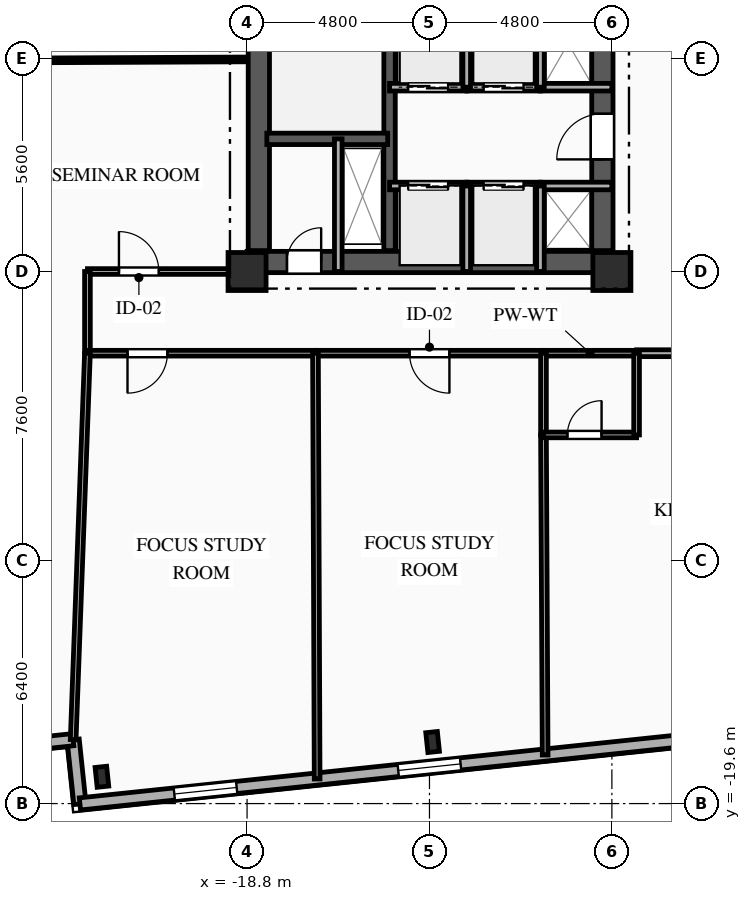
"""IFC4 building model, lengths in metres.
Left out: names, types, materials, properties, quantities, classifications, styles, units other than length and angle.
Written with IfcOpenShell. Run it as: python <this file> out.ifc"""

import sys

from ifc_helpers import new_model, si_unit, direction, frame, frame_2d, origin, origin_2d, place, context, subcontext, project, spatial, rectangle, i_section, extrude, element, fill, save


model = new_model("IFC4")
c1 = context("Model", 3, precision=1e-05, world=origin(), true_north=direction((0.0, 1.0)))
c2 = subcontext(c1, "Body", "Model", "MODEL_VIEW")
j1 = project(units=[si_unit("LENGTHUNIT", "METRE"), si_unit("PLANEANGLEUNIT", "RADIAN")], contexts=[c1])
p1 = place(None, origin())
s1 = spatial("IfcSite", under=j1, at=p1, CompositionType="ELEMENT")
p2 = place(p1, origin())
s2 = spatial("IfcBuilding", under=s1, at=p2, CompositionType="ELEMENT")
p3 = place(p2, frame((0.0, 0.0, 112.5)))
s3 = spatial("IfcBuildingStorey", under=s2, at=p3, CompositionType="ELEMENT", Elevation=112.5)
for number, where, z_axis, x_axis in (
    (1, (-18.8, -5.6, 0.0), (0.0, 0.0, 1.0), (1.0, 0.0, 0.0)),
    (2, (-9.2, -5.6, 0.0), (0.0, 0.0, 1.0), (1.0, 0.0, 0.0)),
):
    element("IfcColumn", number, at=place(p3, frame(where, z_axis=z_axis, x_axis=x_axis)), inside=s3, PredefinedType="COLUMN", context=c2, shape_type="SweptSolid", body=[
        extrude(rectangle(XDim=1.0, YDim=1.0, at=origin_2d()), origin(), (0.0, 0.0, 1.0), 3.35),
    ])
for number, where, z_axis, x_axis in (
    (3, (-22.619, -18.895, 0.0), (0.0, 0.0, 1.0), (0.995, 0.105, 0.0)),
    (4, (-13.917, -17.98, 0.0), (0.0, 0.0, 1.0), (0.995, 0.105, 0.0)),
):
    element("IfcColumn", number, at=place(p3, frame(where, z_axis=z_axis, x_axis=x_axis)), inside=s3, PredefinedType="COLUMN", context=c2, shape_type="SweptSolid", body=[
        extrude(i_section(OverallWidth=0.306, OverallDepth=0.524, WebThickness=0.021, FlangeThickness=0.04, FilletRadius=0.027, at=origin_2d()), origin(), (0.0, 0.0, 1.0), 3.35),
    ])
for number, where, z_axis, x_axis in (
    (5, (-23.198, -19.609, 0.0), (0.0, 0.0, 1.0), (-0.105, 0.995, 0.0)),
    (6, (-23.376, -17.919, 0.0), (0.0, 0.0, 1.0), (-0.995, -0.105, 0.0)),
):
    element("IfcWall", number, at=place(p3, frame(where, z_axis=z_axis, x_axis=x_axis)), inside=s3, PredefinedType="SOLIDWALL", context=c2, shape_type="SweptSolid", body=[
        extrude(rectangle(XDim=1.7, YDim=0.32, at=frame_2d((0.85, 0.0))), origin(), (0.0, 0.0, 1.0), 3.045),
    ])
p4 = place(p3, frame((30.307, -13.986, 0.0), z_axis=(0.0, 0.0, 1.0), x_axis=(-0.994521628355, -0.104531003701, 0.0)))
e7 = element("IfcWall", 7, at=p4, inside=s3, PredefinedType="SOLIDWALL", context=c2, shape_type="SweptSolid", body=[
    extrude(rectangle(XDim=53.8, YDim=0.32, at=frame_2d((26.9, 0.0))), origin(), (0.0, 0.0, 1.0), 3.045),
])
p5 = place(p4, frame((3.098, 0.0, 0.85)))
e8 = element("IfcOpeningElement", 8, at=p5, cuts=e7, PredefinedType="OPENING", context=c2, shape_type="SweptSolid", body=[
    extrude(rectangle(XDim=1.65, YDim=1.85, at=frame_2d((0.825, 0.925))), frame((0.0, 0.17, 0.0), z_axis=(0.0, -1.0, 0.0), x_axis=(1.0, 0.0, 0.0)), (0.0, 0.0, 1.0), 0.34),
])
p6 = place(p4, frame((9.302, 0.0, 0.85)))
e9 = element("IfcOpeningElement", 9, at=p6, cuts=e7, PredefinedType="OPENING", context=c2, shape_type="SweptSolid", body=[
    extrude(rectangle(XDim=1.65, YDim=1.85, at=frame_2d((0.825, 0.925))), frame((0.0, 0.17, 0.0), z_axis=(0.0, -1.0, 0.0), x_axis=(1.0, 0.0, 0.0)), (0.0, 0.0, 1.0), 0.34),
])
p7 = place(p4, frame((14.827, 0.0, 0.85)))
e10 = element("IfcOpeningElement", 10, at=p7, cuts=e7, PredefinedType="OPENING", context=c2, shape_type="SweptSolid", body=[
    extrude(rectangle(XDim=1.65, YDim=1.85, at=frame_2d((0.825, 0.925))), frame((0.0, 0.17, 0.0), z_axis=(0.0, -1.0, 0.0), x_axis=(1.0, 0.0, 0.0)), (0.0, 0.0, 1.0), 0.34),
])
p8 = place(p4, frame((23.078, 0.0, 0.85)))
e11 = element("IfcOpeningElement", 11, at=p8, cuts=e7, PredefinedType="OPENING", context=c2, shape_type="SweptSolid", body=[
    extrude(rectangle(XDim=2.2, YDim=1.85, at=frame_2d((1.1, 0.925))), frame((0.0, 0.17, 0.0), z_axis=(0.0, -1.0, 0.0), x_axis=(1.0, 0.0, 0.0)), (0.0, 0.0, 1.0), 0.34),
])
p9 = place(p4, frame((34.646, 0.0, 0.85)))
e12 = element("IfcOpeningElement", 12, at=p9, cuts=e7, PredefinedType="OPENING", context=c2, shape_type="SweptSolid", body=[
    extrude(rectangle(XDim=2.2, YDim=1.85, at=frame_2d((1.1, 0.925))), frame((0.0, 0.17, 0.0), z_axis=(0.0, -1.0, 0.0), x_axis=(1.0, 0.0, 0.0)), (0.0, 0.0, 1.0), 0.34),
])
p10 = place(p4, frame((43.728, 0.0, 0.85)))
e13 = element("IfcOpeningElement", 13, at=p10, cuts=e7, PredefinedType="OPENING", context=c2, shape_type="SweptSolid", body=[
    extrude(rectangle(XDim=1.65, YDim=1.85, at=frame_2d((0.825, 0.925))), frame((0.0, 0.17, 0.0), z_axis=(0.0, -1.0, 0.0), x_axis=(1.0, 0.0, 0.0)), (0.0, 0.0, 1.0), 0.34),
])
p11 = place(p4, frame((49.653, 0.0, 0.85)))
e14 = element("IfcOpeningElement", 14, at=p11, cuts=e7, PredefinedType="OPENING", context=c2, shape_type="SweptSolid", body=[
    extrude(rectangle(XDim=1.65, YDim=1.85, at=frame_2d((0.825, 0.925))), frame((0.0, 0.17, 0.0), z_axis=(0.0, -1.0, 0.0), x_axis=(1.0, 0.0, 0.0)), (0.0, 0.0, 1.0), 0.34),
])
p12 = place(p3, frame((-18.8, -5.35, 0.0), z_axis=(0.0, 0.0, 1.0), x_axis=(1.0, 0.0, 0.0)))
e15 = element("IfcWall", 15, at=p12, inside=s3, PredefinedType="SHEAR", context=c2, shape_type="SweptSolid", body=[
    extrude(rectangle(XDim=9.6, YDim=0.56, at=frame_2d((4.8, 0.0))), origin(), (0.0, 0.0, 1.0), 3.045),
])
p13 = place(p12, frame((1.05, 0.0, 0.0)))
e16 = element("IfcOpeningElement", 16, at=p13, cuts=e15, PredefinedType="OPENING", context=c2, shape_type="SweptSolid", body=[
    extrude(rectangle(XDim=0.9, YDim=2.1, at=frame_2d((0.45, 1.05))), frame((0.0, 0.29, 0.0), z_axis=(0.0, -1.0, 0.0), x_axis=(1.0, 0.0, 0.0)), (0.0, 0.0, 1.0), 0.58),
])
p14 = place(p3, frame((-18.49, -5.05, 0.0), z_axis=(0.0, 0.0, 1.0), x_axis=(0.0, 1.0, 0.0)))
e17 = element("IfcWall", 17, at=p14, inside=s3, PredefinedType="SHEAR", context=c2, shape_type="SweptSolid", body=[
    extrude(rectangle(XDim=10.1, YDim=0.56, at=frame_2d((5.05, 0.0))), origin(), (0.0, 0.0, 1.0), 3.045),
])
p15 = place(p3, frame((-9.45, -5.05, 0.0), z_axis=(0.0, 0.0, 1.0), x_axis=(0.0, 1.0, 0.0)))
e18 = element("IfcWall", 18, at=p15, inside=s3, PredefinedType="SHEAR", context=c2, shape_type="SweptSolid", body=[
    extrude(rectangle(XDim=10.1, YDim=0.56, at=frame_2d((5.05, 0.0))), origin(), (0.0, 0.0, 1.0), 3.045),
])
p16 = place(p15, frame((7.15, 0.0, 0.0)))
e19 = element("IfcOpeningElement", 19, at=p16, cuts=e18, PredefinedType="OPENING", context=c2, shape_type="SweptSolid", body=[
    extrude(rectangle(XDim=0.9, YDim=2.1, at=frame_2d((0.45, 1.05))), frame((0.0, 0.29, 0.0), z_axis=(0.0, -1.0, 0.0), x_axis=(1.0, 0.0, 0.0)), (0.0, 0.0, 1.0), 0.58),
])
p17 = place(p15, frame((2.4, 0.0, 0.0)))
e20 = element("IfcOpeningElement", 20, at=p17, cuts=e18, PredefinedType="OPENING", context=c2, shape_type="SweptSolid", body=[
    extrude(rectangle(XDim=1.2, YDim=2.15, at=frame_2d((0.6, 1.075))), frame((0.0, 0.29, 0.0), z_axis=(0.0, -1.0, 0.0), x_axis=(1.0, 0.0, 0.0)), (0.0, 0.0, 1.0), 0.58),
])
p18 = place(p3, frame((-15.05, -5.05, 0.0), z_axis=(0.0, 0.0, 1.0), x_axis=(0.0, 1.0, 0.0)))
e21 = element("IfcWall", 21, at=p18, inside=s3, PredefinedType="SHEAR", context=c2, shape_type="SweptSolid", body=[
    extrude(rectangle(XDim=10.1, YDim=0.3, at=frame_2d((5.05, 0.0))), origin(), (0.0, 0.0, 1.0), 3.045),
])
p19 = place(p3, frame((-18.28, -2.11, 0.0), z_axis=(0.0, 0.0, 1.0), x_axis=(1.0, 0.0, 0.0)))
e22 = element("IfcWall", 22, at=p19, inside=s3, PredefinedType="SHEAR", context=c2, shape_type="SweptSolid", body=[
    extrude(rectangle(XDim=3.18, YDim=0.3, at=frame_2d((1.59, 0.0))), origin(), (0.0, 0.0, 1.0), 3.045),
])
p20 = place(p3, frame((-16.4, -5.6, 0.0), z_axis=(0.0, 0.0, 1.0), x_axis=(0.0, 1.0, 0.0)))
e23 = element("IfcWall", 23, at=p20, inside=s3, PredefinedType="PARTITIONING", context=c2, shape_type="SweptSolid", body=[
    extrude(rectangle(XDim=3.49, YDim=0.2, at=frame_2d((1.745, 0.0))), origin(), (0.0, 0.0, 1.0), 3.045),
])
p21 = place(p3, frame((-15.05, -3.35, 0.0), z_axis=(0.0, 0.0, 1.0), x_axis=(1.0, 0.0, 0.0)))
e24 = element("IfcWall", 24, at=p21, inside=s3, PredefinedType="PARTITIONING", context=c2, shape_type="SweptSolid", body=[
    extrude(rectangle(XDim=2.03, YDim=0.2, at=frame_2d((1.015, 0.0))), origin(), (0.0, 0.0, 1.0), 3.045),
])
p22 = place(p21, frame((0.49, 0.0, 0.0)))
e25 = element("IfcOpeningElement", 25, at=p22, cuts=e24, PredefinedType="OPENING", context=c2, shape_type="SweptSolid", body=[
    extrude(rectangle(XDim=1.05, YDim=2.1, at=frame_2d((0.525, 1.05))), frame((0.0, 0.11, 0.0), z_axis=(0.0, -1.0, 0.0), x_axis=(1.0, 0.0, 0.0)), (0.0, 0.0, 1.0), 0.22),
])
p23 = place(p3, frame((-13.02, -3.35, 0.0), z_axis=(0.0, 0.0, 1.0), x_axis=(1.0, 0.0, 0.0)))
e26 = element("IfcWall", 26, at=p23, inside=s3, PredefinedType="PARTITIONING", context=c2, shape_type="SweptSolid", body=[
    extrude(rectangle(XDim=1.94, YDim=0.2, at=frame_2d((0.97, 0.0))), origin(), (0.0, 0.0, 1.0), 3.045),
])
p24 = place(p23, frame((0.445, 0.0, 0.0)))
e27 = element("IfcOpeningElement", 27, at=p24, cuts=e26, PredefinedType="OPENING", context=c2, shape_type="SweptSolid", body=[
    extrude(rectangle(XDim=1.05, YDim=2.1, at=frame_2d((0.525, 1.05))), frame((0.0, 0.11, 0.0), z_axis=(0.0, -1.0, 0.0), x_axis=(1.0, 0.0, 0.0)), (0.0, 0.0, 1.0), 0.22),
])
p25 = place(p3, frame((-11.08, -3.35, 0.0), z_axis=(0.0, 0.0, 1.0), x_axis=(1.0, 0.0, 0.0)))
e28 = element("IfcWall", 28, at=p25, inside=s3, PredefinedType="PARTITIONING", context=c2, shape_type="SweptSolid", body=[
    extrude(rectangle(XDim=1.88, YDim=0.2, at=frame_2d((0.94, 0.0))), origin(), (0.0, 0.0, 1.0), 2.76),
])
p26 = place(p3, frame((-13.02, -0.75, 0.0), z_axis=(0.0, 0.0, 1.0), x_axis=(-1.0, 0.0, 0.0)))
e29 = element("IfcWall", 29, at=p26, inside=s3, PredefinedType="PARTITIONING", context=c2, shape_type="SweptSolid", body=[
    extrude(rectangle(XDim=2.03, YDim=0.2, at=frame_2d((1.015, 0.0))), origin(), (0.0, 0.0, 1.0), 3.045),
])
p27 = place(p26, frame((0.49, 0.0, 0.0)))
e30 = element("IfcOpeningElement", 30, at=p27, cuts=e29, PredefinedType="OPENING", context=c2, shape_type="SweptSolid", body=[
    extrude(rectangle(XDim=1.05, YDim=2.1, at=frame_2d((0.525, 1.05))), frame((0.0, 0.11, 0.0), z_axis=(0.0, -1.0, 0.0), x_axis=(1.0, 0.0, 0.0)), (0.0, 0.0, 1.0), 0.22),
])
p28 = place(p3, frame((-11.08, -0.75, 0.0), z_axis=(0.0, 0.0, 1.0), x_axis=(-1.0, 0.0, 0.0)))
e31 = element("IfcWall", 31, at=p28, inside=s3, PredefinedType="PARTITIONING", context=c2, shape_type="SweptSolid", body=[
    extrude(rectangle(XDim=1.94, YDim=0.2, at=frame_2d((0.97, 0.0))), origin(), (0.0, 0.0, 1.0), 3.045),
])
p29 = place(p28, frame((0.445, 0.0, 0.0)))
e32 = element("IfcOpeningElement", 32, at=p29, cuts=e31, PredefinedType="OPENING", context=c2, shape_type="SweptSolid", body=[
    extrude(rectangle(XDim=1.05, YDim=2.1, at=frame_2d((0.525, 1.05))), frame((0.0, 0.11, 0.0), z_axis=(0.0, -1.0, 0.0), x_axis=(1.0, 0.0, 0.0)), (0.0, 0.0, 1.0), 0.22),
])
p30 = place(p3, frame((-9.2, -0.75, 0.0), z_axis=(0.0, 0.0, 1.0), x_axis=(-1.0, 0.0, 0.0)))
e33 = element("IfcWall", 33, at=p30, inside=s3, PredefinedType="PARTITIONING", context=c2, shape_type="SweptSolid", body=[
    extrude(rectangle(XDim=1.88, YDim=0.2, at=frame_2d((0.94, 0.0))), origin(), (0.0, 0.0, 1.0), 3.045),
])
for number, where, z_axis, x_axis in (
    (34, (-13.02, -5.6, 0.0), (0.0, 0.0, 1.0), (0.0, 1.0, 0.0)),
    (35, (-11.08, -5.6, 0.0), (0.0, 0.0, 1.0), (0.0, 1.0, 0.0)),
):
    element("IfcWall", number, at=place(p3, frame(where, z_axis=z_axis, x_axis=x_axis)), inside=s3, PredefinedType="PARTITIONING", context=c2, shape_type="SweptSolid", body=[
        extrude(rectangle(XDim=2.25, YDim=0.2, at=frame_2d((1.125, 0.0))), origin(), (0.0, 0.0, 1.0), 3.045),
    ])
for number, where, z_axis, x_axis in (
    (36, (-13.02, -0.75, 0.0), (0.0, 0.0, 1.0), (0.0, 1.0, 0.0)),
    (37, (-11.08, -0.75, 0.0), (0.0, 0.0, 1.0), (0.0, 1.0, 0.0)),
):
    element("IfcWall", number, at=place(p3, frame(where, z_axis=z_axis, x_axis=x_axis)), inside=s3, PredefinedType="PARTITIONING", context=c2, shape_type="SweptSolid", body=[
        extrude(rectangle(XDim=2.3, YDim=0.2, at=frame_2d((1.15, 0.0))), origin(), (0.0, 0.0, 1.0), 3.045),
    ])
p31 = place(p3, frame((-23.0, -5.6, 0.0), z_axis=(0.0, 0.0, 1.0), x_axis=(1.0, 0.0, 0.0)))
e38 = element("IfcWall", 38, at=p31, inside=s3, PredefinedType="PARTITIONING", context=c2, shape_type="SweptSolid", body=[
    extrude(rectangle(XDim=4.2, YDim=0.15, at=frame_2d((2.1, 0.0))), origin(), (0.0, 0.0, 1.0), 3.045),
])
p32 = place(p31, frame((0.829, 0.0, 0.0)))
e39 = element("IfcOpeningElement", 39, at=p32, cuts=e38, PredefinedType="OPENING", context=c2, shape_type="SweptSolid", body=[
    extrude(rectangle(XDim=1.05, YDim=2.15, at=frame_2d((0.525, 1.075))), frame((0.0, 0.085, 0.0), z_axis=(0.0, -1.0, 0.0), x_axis=(1.0, 0.0, 0.0)), (0.0, 0.0, 1.0), 0.17),
])
p33 = place(p3, frame((-23.0, -7.75, 0.0), z_axis=(0.0, 0.0, 1.0), x_axis=(0.0, 1.0, 0.0)))
e40 = element("IfcWall", 40, at=p33, inside=s3, PredefinedType="PARTITIONING", context=c2, shape_type="SweptSolid", body=[
    extrude(rectangle(XDim=2.15, YDim=0.15, at=frame_2d((1.075, 0.0))), origin(), (0.0, 0.0, 1.0), 2.7),
])
p34 = place(p3, frame((-17.0, -7.75, 0.0), z_axis=(0.0, 0.0, 1.0), x_axis=(-1.0, 0.0, 0.0)))
e41 = element("IfcWall", 41, at=p34, inside=s3, PredefinedType="PARTITIONING", context=c2, shape_type="SweptSolid", body=[
    extrude(rectangle(XDim=6.0, YDim=0.15, at=frame_2d((3.0, 0.0))), origin(), (0.0, 0.0, 1.0), 3.045),
])
p35 = place(p34, frame((3.896, 0.0, 0.0)))
e42 = element("IfcOpeningElement", 42, at=p35, cuts=e41, PredefinedType="OPENING", context=c2, shape_type="SweptSolid", body=[
    extrude(rectangle(XDim=1.05, YDim=2.15, at=frame_2d((0.525, 1.075))), frame((0.0, 0.085, 0.0), z_axis=(0.0, -1.0, 0.0), x_axis=(1.0, 0.0, 0.0)), (0.0, 0.0, 1.0), 0.17),
])
p36 = place(p3, frame((-11.0, -7.75, 0.0), z_axis=(0.0, 0.0, 1.0), x_axis=(-1.0, 0.0, 0.0)))
e43 = element("IfcWall", 43, at=p36, inside=s3, PredefinedType="PARTITIONING", context=c2, shape_type="SweptSolid", body=[
    extrude(rectangle(XDim=6.0, YDim=0.15, at=frame_2d((3.0, 0.0))), origin(), (0.0, 0.0, 1.0), 3.045),
])
p37 = place(p36, frame((2.475, 0.0, 0.0)))
e44 = element("IfcOpeningElement", 44, at=p37, cuts=e43, PredefinedType="OPENING", context=c2, shape_type="SweptSolid", body=[
    extrude(rectangle(XDim=1.05, YDim=2.15, at=frame_2d((0.525, 1.075))), frame((0.0, 0.085, 0.0), z_axis=(0.0, -1.0, 0.0), x_axis=(1.0, 0.0, 0.0)), (0.0, 0.0, 1.0), 0.17),
])
p38 = place(p3, frame((0.0, -7.75, 0.0), z_axis=(0.0, 0.0, 1.0), x_axis=(-1.0, 0.0, 0.0)))
e45 = element("IfcWall", 45, at=p38, inside=s3, PredefinedType="PARTITIONING", context=c2, shape_type="SweptSolid", body=[
    extrude(rectangle(XDim=8.55, YDim=0.18, at=frame_2d((4.275, 0.0))), origin(), (0.0, 0.0, 1.0), 3.045),
])
p39 = place(p38, frame((1.379, 0.0, 0.0)))
e46 = element("IfcOpeningElement", 46, at=p39, cuts=e45, PredefinedType="OPENING", context=c2, shape_type="SweptSolid", body=[
    extrude(rectangle(XDim=1.0, YDim=2.15, at=frame_2d((0.5, 1.075))), frame((0.0, 0.1, 0.0), z_axis=(0.0, -1.0, 0.0), x_axis=(1.0, 0.0, 0.0)), (0.0, 0.0, 1.0), 0.2),
])
p40 = place(p3, frame((-8.55, -7.75, 0.0), z_axis=(0.0, 0.0, 1.0), x_axis=(-1.0, 0.0, 0.0)))
e47 = element("IfcWall", 47, at=p40, inside=s3, PredefinedType="PLUMBINGWALL", context=c2, shape_type="SweptSolid", body=[
    extrude(rectangle(XDim=2.45, YDim=0.15, at=frame_2d((1.225, 0.0))), origin(), (0.0, 0.0, 1.0), 3.045),
])
p41 = place(p3, frame((-28.671, -0.064, 0.0), z_axis=(0.0, 0.0, 1.0), x_axis=(0.999990089865, 0.004451985263, 0.0)))
e48 = element("IfcWall", 48, at=p41, inside=s3, PredefinedType="PARTITIONING", context=c2, shape_type="SweptSolid", body=[
    extrude(rectangle(XDim=9.871, YDim=0.125, at=frame_2d((4.936, 0.0))), origin(), (0.0, 0.0, 1.0), 3.045),
])
p42 = place(p3, frame((-23.0, -7.75, 0.0), z_axis=(0.0, 0.0, 1.0), x_axis=(-0.036924695214, -0.999318050914, 0.0)))
e49 = element("IfcWall", 49, at=p42, inside=s3, PredefinedType="PARTITIONING", context=c2, shape_type="SweptSolid", body=[
    extrude(rectangle(XDim=10.176, YDim=0.15, at=frame_2d((5.088, 0.0))), origin(), (0.0, 0.0, 1.0), 3.045),
])
p43 = place(p3, frame((-17.0, -7.75, 0.0), z_axis=(0.0, 0.0, 1.0), x_axis=(0.003922478487, -0.999992307052, 0.0)))
e50 = element("IfcWall", 50, at=p43, inside=s3, PredefinedType="PARTITIONING", context=c2, shape_type="SweptSolid", body=[
    extrude(rectangle(XDim=11.203, YDim=0.15, at=frame_2d((5.602, 0.0))), origin(), (0.0, 0.0, 1.0), 3.045),
])
p44 = place(p3, frame((-11.0, -9.9, 0.0), z_axis=(0.0, 0.0, 1.0), x_axis=(0.005217320294, -0.999986389692, 0.0)))
e51 = element("IfcWall", 51, at=p44, inside=s3, PredefinedType="PARTITIONING", context=c2, shape_type="SweptSolid", body=[
    extrude(rectangle(XDim=8.423, YDim=0.15, at=frame_2d((4.211, 0.0))), origin(), (0.0, 0.0, 1.0), 3.045),
])
p45 = place(p3, frame((-11.0, -7.75, 0.0), z_axis=(0.0, 0.0, 1.0), x_axis=(0.0, -1.0, 0.0)))
e52 = element("IfcWall", 52, at=p45, inside=s3, PredefinedType="PLUMBINGWALL", context=c2, shape_type="SweptSolid", body=[
    extrude(rectangle(XDim=2.15, YDim=0.15, at=frame_2d((1.075, 0.0))), origin(), (0.0, 0.0, 1.0), 3.045),
])
p46 = place(p3, frame((-11.0, -9.9, 0.0), z_axis=(0.0, 0.0, 1.0), x_axis=(1.0, 0.0, 0.0)))
e53 = element("IfcWall", 53, at=p46, inside=s3, PredefinedType="PLUMBINGWALL", context=c2, shape_type="SweptSolid", body=[
    extrude(rectangle(XDim=2.45, YDim=0.15, at=frame_2d((1.225, 0.0))), origin(), (0.0, 0.0, 1.0), 3.045),
])
p47 = place(p46, frame((0.629, 0.0, 0.0)))
e54 = element("IfcOpeningElement", 54, at=p47, cuts=e53, PredefinedType="OPENING", context=c2, shape_type="SweptSolid", body=[
    extrude(rectangle(XDim=0.9, YDim=2.1, at=frame_2d((0.45, 1.05))), frame((0.0, 0.085, 0.0), z_axis=(0.0, -1.0, 0.0), x_axis=(1.0, 0.0, 0.0)), (0.0, 0.0, 1.0), 0.17),
])
p48 = place(p3, frame((-8.55, -9.9, 0.0), z_axis=(0.0, 0.0, 1.0), x_axis=(0.0, 1.0, 0.0)))
e55 = element("IfcWall", 55, at=p48, inside=s3, PredefinedType="PLUMBINGWALL", context=c2, shape_type="SweptSolid", body=[
    extrude(rectangle(XDim=2.15, YDim=0.15, at=frame_2d((1.075, 0.0))), origin(), (0.0, 0.0, 1.0), 3.045),
])
p49 = place(p10, origin())
e56 = element("IfcWindow", 56, at=p49, inside=s3, PartitioningType="SINGLE_PANEL", PredefinedType="WINDOW", context=c2, shape_type="SweptSolid", body=[
    extrude(rectangle(XDim=1.65, YDim=1.85, at=frame_2d((0.825, 0.925))), frame((0.0, 0.03, 0.0), z_axis=(0.0, -1.0, 0.0), x_axis=(1.0, 0.0, 0.0)), (0.0, 0.0, 1.0), 0.06),
])
fill(e13, e56)
p50 = place(p11, origin())
e57 = element("IfcWindow", 57, at=p50, inside=s3, PartitioningType="SINGLE_PANEL", PredefinedType="WINDOW", context=c2, shape_type="SweptSolid", body=[
    extrude(rectangle(XDim=1.65, YDim=1.85, at=frame_2d((0.825, 0.925))), frame((0.0, 0.03, 0.0), z_axis=(0.0, -1.0, 0.0), x_axis=(1.0, 0.0, 0.0)), (0.0, 0.0, 1.0), 0.06),
])
fill(e14, e57)
p51 = place(p13, origin())
e58 = element("IfcDoor", 58, at=p51, inside=s3, OperationType="SINGLE_SWING_RIGHT", PredefinedType="DOOR", context=c2, shape_type="SweptSolid", body=[
    extrude(rectangle(XDim=0.9, YDim=2.1, at=frame_2d((0.45, 1.05))), frame((0.0, 0.025, 0.0), z_axis=(0.0, -1.0, 0.0), x_axis=(1.0, 0.0, 0.0)), (0.0, 0.0, 1.0), 0.05),
])
fill(e16, e58)
p52 = place(p22, origin())
e59 = element("IfcDoor", 59, at=p52, inside=s3, OperationType="DOUBLE_DOOR_SLIDING", PredefinedType="DOOR", context=c2, shape_type="SweptSolid", body=[
    extrude(rectangle(XDim=1.05, YDim=2.1, at=frame_2d((0.525, 1.05))), frame((0.0, 0.025, 0.0), z_axis=(0.0, -1.0, 0.0), x_axis=(1.0, 0.0, 0.0)), (0.0, 0.0, 1.0), 0.05),
])
fill(e25, e59)
p53 = place(p24, origin())
e60 = element("IfcDoor", 60, at=p53, inside=s3, OperationType="DOUBLE_DOOR_SLIDING", PredefinedType="DOOR", context=c2, shape_type="SweptSolid", body=[
    extrude(rectangle(XDim=1.05, YDim=2.1, at=frame_2d((0.525, 1.05))), frame((0.0, 0.025, 0.0), z_axis=(0.0, -1.0, 0.0), x_axis=(1.0, 0.0, 0.0)), (0.0, 0.0, 1.0), 0.05),
])
fill(e27, e60)
p54 = place(p27, origin())
e61 = element("IfcDoor", 61, at=p54, inside=s3, OperationType="DOUBLE_DOOR_SLIDING", PredefinedType="DOOR", context=c2, shape_type="SweptSolid", body=[
    extrude(rectangle(XDim=1.05, YDim=2.1, at=frame_2d((0.525, 1.05))), frame((0.0, 0.025, 0.0), z_axis=(0.0, -1.0, 0.0), x_axis=(1.0, 0.0, 0.0)), (0.0, 0.0, 1.0), 0.05),
])
fill(e30, e61)
p55 = place(p29, origin())
e62 = element("IfcDoor", 62, at=p55, inside=s3, OperationType="DOUBLE_DOOR_SLIDING", PredefinedType="DOOR", context=c2, shape_type="SweptSolid", body=[
    extrude(rectangle(XDim=1.05, YDim=2.1, at=frame_2d((0.525, 1.05))), frame((0.0, 0.025, 0.0), z_axis=(0.0, -1.0, 0.0), x_axis=(1.0, 0.0, 0.0)), (0.0, 0.0, 1.0), 0.05),
])
fill(e32, e62)
p56 = place(p17, origin())
e63 = element("IfcDoor", 63, at=p56, inside=s3, OperationType="SINGLE_SWING_LEFT", PredefinedType="DOOR", context=c2, shape_type="SweptSolid", body=[
    extrude(rectangle(XDim=1.2, YDim=2.15, at=frame_2d((0.6, 1.075))), frame((0.0, 0.025, 0.0), z_axis=(0.0, -1.0, 0.0), x_axis=(1.0, 0.0, 0.0)), (0.0, 0.0, 1.0), 0.05),
])
fill(e20, e63)
p57 = place(p32, origin())
e64 = element("IfcDoor", 64, at=p57, inside=s3, OperationType="SINGLE_SWING_LEFT", PredefinedType="DOOR", context=c2, shape_type="SweptSolid", body=[
    extrude(rectangle(XDim=1.05, YDim=2.15, at=frame_2d((0.525, 1.075))), frame((0.0, 0.025, 0.0), z_axis=(0.0, -1.0, 0.0), x_axis=(1.0, 0.0, 0.0)), (0.0, 0.0, 1.0), 0.05),
])
fill(e39, e64)
p58 = place(p35, origin())
e65 = element("IfcDoor", 65, at=p58, inside=s3, OperationType="SINGLE_SWING_RIGHT", PredefinedType="DOOR", context=c2, shape_type="SweptSolid", body=[
    extrude(rectangle(XDim=1.05, YDim=2.15, at=frame_2d((0.525, 1.075))), frame((0.0, 0.025, 0.0), z_axis=(0.0, -1.0, 0.0), x_axis=(1.0, 0.0, 0.0)), (0.0, 0.0, 1.0), 0.05),
])
fill(e42, e65)
p59 = place(p37, origin())
e66 = element("IfcDoor", 66, at=p59, inside=s3, OperationType="SINGLE_SWING_LEFT", PredefinedType="DOOR", context=c2, shape_type="SweptSolid", body=[
    extrude(rectangle(XDim=1.05, YDim=2.15, at=frame_2d((0.525, 1.075))), frame((0.0, 0.025, 0.0), z_axis=(0.0, -1.0, 0.0), x_axis=(1.0, 0.0, 0.0)), (0.0, 0.0, 1.0), 0.05),
])
fill(e44, e66)
p60 = place(p47, origin())
e67 = element("IfcDoor", 67, at=p60, inside=s3, OperationType="SINGLE_SWING_RIGHT", PredefinedType="DOOR", context=c2, shape_type="SweptSolid", body=[
    extrude(rectangle(XDim=0.9, YDim=2.1, at=frame_2d((0.45, 1.05))), frame((0.0, 0.025, 0.0), z_axis=(0.0, -1.0, 0.0), x_axis=(1.0, 0.0, 0.0)), (0.0, 0.0, 1.0), 0.05),
])
fill(e54, e67)
save(model, sys.argv[1])
